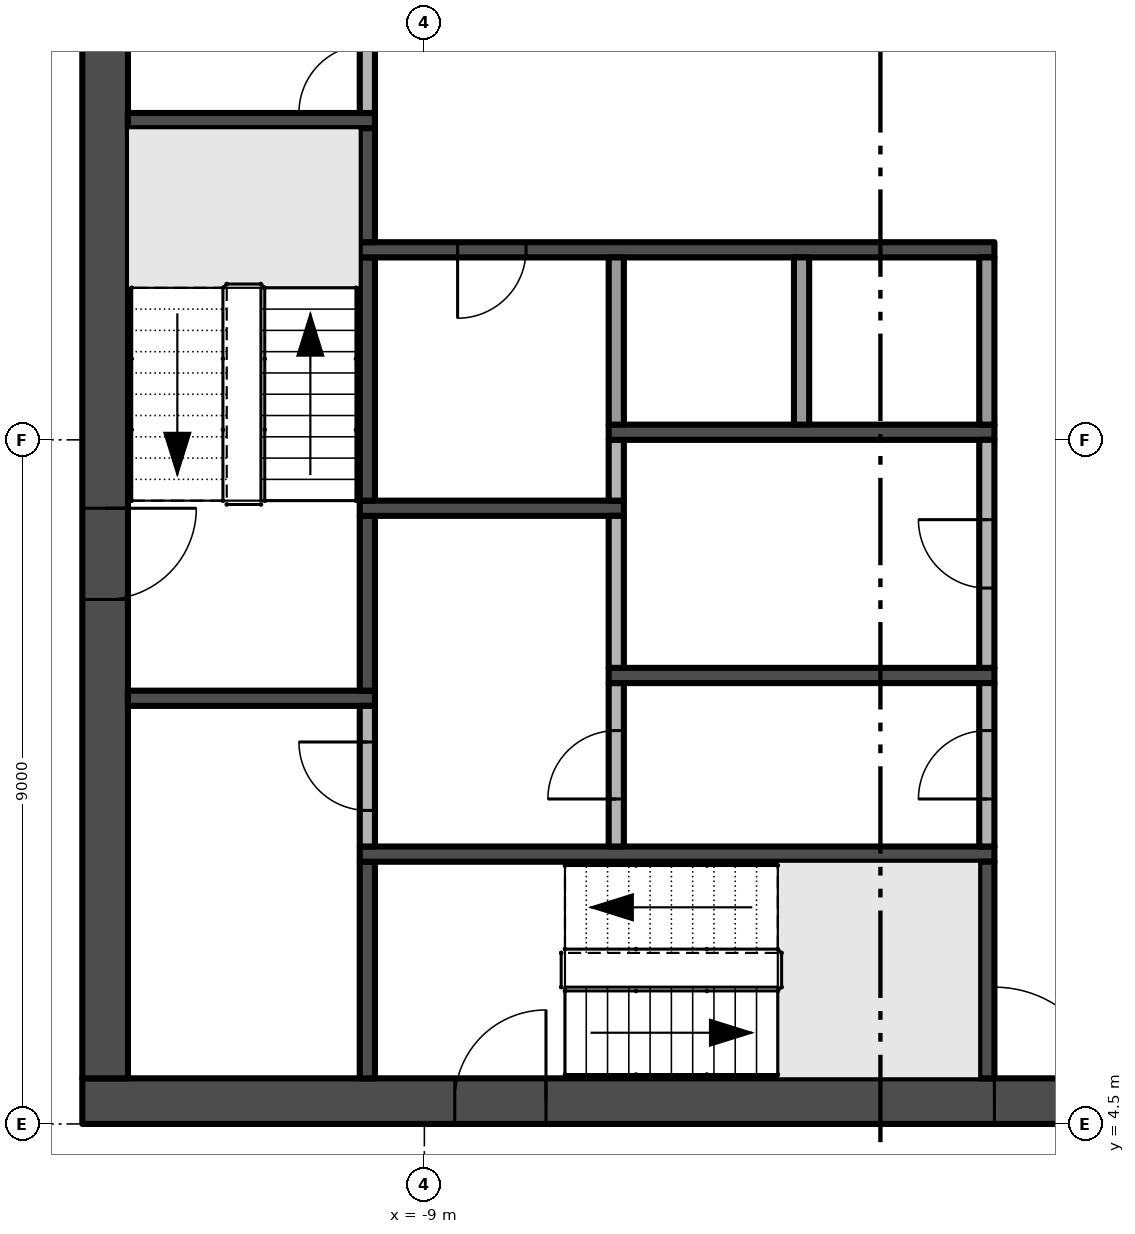
"""IFC4 building model, lengths in metres.
Left out: names, types, materials, properties, quantities, classifications, styles, units other than length and angle.
Written with IfcOpenShell. Run it as: python <this file> out.ifc"""

import sys

from ifc_helpers import new_model, si_unit, direction, frame, frame_2d, origin, place, context, subcontext, project, spatial, rectangle, extrude, element, fill, save


model = new_model("IFC4")
c1 = context("Model", 3, precision=1e-05, world=origin(), true_north=direction((0.0, 1.0)))
c2 = subcontext(c1, "Body", "Model", "MODEL_VIEW")
j1 = project(units=[si_unit("LENGTHUNIT", "METRE"), si_unit("PLANEANGLEUNIT", "RADIAN")], contexts=[c1])
p1 = place(None, origin())
s1 = spatial("IfcSite", under=j1, at=p1, CompositionType="ELEMENT")
p2 = place(p1, origin())
s2 = spatial("IfcBuilding", under=s1, at=p2, CompositionType="ELEMENT")
p3 = place(p2, frame((0.0, 0.0, 214.8)))
s3 = spatial("IfcBuildingStorey", under=s2, at=p3, CompositionType="ELEMENT", Elevation=214.8)
p4 = place(p3, frame((-13.5, 4.8, -0.3), z_axis=(0.0, 0.0, 1.0), x_axis=(1.0, 0.0, 0.0)))
e1 = element("IfcWall", 1, at=p4, inside=s3, PredefinedType="SHEAR", context=c2, shape_type="SweptSolid", body=[
    extrude(rectangle(XDim=27.0, YDim=0.6, at=frame_2d((13.5, 0.0))), origin(), (0.0, 0.0, 1.0), 3.8),
])
p5 = place(p4, frame((12.0, 0.0, 0.3)))
e2 = element("IfcOpeningElement", 2, at=p5, cuts=e1, PredefinedType="OPENING", context=c2, shape_type="SweptSolid", body=[
    extrude(rectangle(XDim=3.0, YDim=2.4, at=frame_2d((1.5, 1.2))), frame((0.0, 0.31, 0.0), z_axis=(0.0, -1.0, 0.0), x_axis=(1.0, 0.0, 0.0)), (0.0, 0.0, 1.0), 0.62),
])
p6 = place(p4, frame((4.9, 0.0, 0.3)))
e3 = element("IfcOpeningElement", 3, at=p6, cuts=e1, PredefinedType="OPENING", context=c2, shape_type="SweptSolid", body=[
    extrude(rectangle(XDim=1.2, YDim=2.2, at=frame_2d((0.6, 1.1))), frame((0.0, 0.31, 0.0), z_axis=(0.0, -1.0, 0.0), x_axis=(1.0, 0.0, 0.0)), (0.0, 0.0, 1.0), 0.62),
])
p7 = place(p4, frame((20.75, 0.0, 0.3)))
e4 = element("IfcOpeningElement", 4, at=p7, cuts=e1, PredefinedType="OPENING", context=c2, shape_type="SweptSolid", body=[
    extrude(rectangle(XDim=1.5, YDim=2.2, at=frame_2d((0.75, 1.1))), frame((0.0, 0.31, 0.0), z_axis=(0.0, -1.0, 0.0), x_axis=(1.0, 0.0, 0.0)), (0.0, 0.0, 1.0), 0.62),
])
p8 = place(p4, frame((17.4, 0.0, 0.3)))
e5 = element("IfcOpeningElement", 5, at=p8, cuts=e1, PredefinedType="OPENING", context=c2, shape_type="SweptSolid", body=[
    extrude(rectangle(XDim=1.2, YDim=2.2, at=frame_2d((0.6, 1.1))), frame((0.0, 0.31, 0.0), z_axis=(0.0, -1.0, 0.0), x_axis=(1.0, 0.0, 0.0)), (0.0, 0.0, 1.0), 0.62),
])
p9 = place(p3, frame((-13.2, 21.9, -0.3), z_axis=(0.0, 0.0, 1.0), x_axis=(0.0, -1.0, 0.0)))
e6 = element("IfcWall", 6, at=p9, inside=s3, PredefinedType="SHEAR", context=c2, shape_type="SweptSolid", body=[
    extrude(rectangle(XDim=16.8, YDim=0.6, at=frame_2d((8.4, 0.0))), origin(), (0.0, 0.0, 1.0), 3.8),
])
p10 = place(p9, frame((9.3, 0.0, 0.3)))
e7 = element("IfcOpeningElement", 7, at=p10, cuts=e6, PredefinedType="OPENING", context=c2, shape_type="SweptSolid", body=[
    extrude(rectangle(XDim=1.2, YDim=2.2, at=frame_2d((0.6, 1.1))), frame((0.0, 0.31, 0.0), z_axis=(0.0, -1.0, 0.0), x_axis=(1.0, 0.0, 0.0)), (0.0, 0.0, 1.0), 0.62),
])
for number, where, z_axis, x_axis in (
    (8, (-12.9, 10.1, 0.0), (0.0, 0.0, 1.0), (1.0, 0.0, 0.0)),
    (9, (-12.9, 17.7, 0.0), (0.0, 0.0, 1.0), (1.0, 0.0, 0.0)),
):
    element("IfcWall", number, at=place(p3, frame(where, z_axis=z_axis, x_axis=x_axis)), inside=s3, PredefinedType="SHEAR", context=c2, shape_type="SweptSolid", body=[
        extrude(rectangle(XDim=3.25, YDim=0.2, at=frame_2d((1.625, 0.0))), origin(), (0.0, 0.0, 1.0), 3.5),
    ])
p11 = place(p3, frame((-9.75, 5.1, 0.0), z_axis=(0.0, 0.0, 1.0), x_axis=(0.0, 1.0, 0.0)))
e10 = element("IfcWall", 10, at=p11, inside=s3, PredefinedType="SHEAR", context=c2, shape_type="SweptSolid", body=[
    extrude(rectangle(XDim=2.85, YDim=0.2, at=frame_2d((1.425, 0.0))), origin(), (0.0, 0.0, 1.0), 3.5),
])
p12 = place(p3, frame((-9.85, 8.05, 0.0), z_axis=(0.0, 0.0, 1.0), x_axis=(1.0, 0.0, 0.0)))
e11 = element("IfcWall", 11, at=p12, inside=s3, PredefinedType="SHEAR", context=c2, shape_type="SweptSolid", body=[
    extrude(rectangle(XDim=8.35, YDim=0.2, at=frame_2d((4.175, 0.0))), origin(), (0.0, 0.0, 1.0), 3.5),
])
p13 = place(p3, frame((-9.75, 8.15, 0.0), z_axis=(0.0, 0.0, 1.0), x_axis=(0.0, 1.0, 0.0)))
e12 = element("IfcWall", 12, at=p13, inside=s3, PredefinedType="PARTITIONING", context=c2, shape_type="SweptSolid", body=[
    extrude(rectangle(XDim=1.85, YDim=0.2, at=frame_2d((0.925, 0.0))), origin(), (0.0, 0.0, 1.0), 3.5),
])
p14 = place(p13, frame((0.475, 0.0, 0.0)))
e13 = element("IfcOpeningElement", 13, at=p14, cuts=e12, PredefinedType="OPENING", context=c2, shape_type="SweptSolid", body=[
    extrude(rectangle(XDim=0.9, YDim=2.1, at=frame_2d((0.45, 1.05))), frame((0.0, 0.11, 0.0), z_axis=(0.0, -1.0, 0.0), x_axis=(1.0, 0.0, 0.0)), (0.0, 0.0, 1.0), 0.22),
])
p15 = place(p3, frame((-9.75, 10.2, 0.0), z_axis=(0.0, 0.0, 1.0), x_axis=(0.0, 1.0, 0.0)))
e14 = element("IfcWall", 14, at=p15, inside=s3, PredefinedType="SHEAR", context=c2, shape_type="SweptSolid", body=[
    extrude(rectangle(XDim=2.3, YDim=0.2, at=frame_2d((1.15, 0.0))), origin(), (0.0, 0.0, 1.0), 3.5),
])
p16 = place(p3, frame((-9.85, 12.6, 0.0), z_axis=(0.0, 0.0, 1.0), x_axis=(1.0, 0.0, 0.0)))
e15 = element("IfcWall", 15, at=p16, inside=s3, PredefinedType="SHEAR", context=c2, shape_type="SweptSolid", body=[
    extrude(rectangle(XDim=3.475, YDim=0.2, at=frame_2d((1.738, 0.0))), origin(), (0.0, 0.0, 1.0), 3.5),
])
p17 = place(p3, frame((-9.75, 12.7, 0.0), z_axis=(0.0, 0.0, 1.0), x_axis=(0.0, 1.0, 0.0)))
e16 = element("IfcWall", 16, at=p17, inside=s3, PredefinedType="SHEAR", context=c2, shape_type="SweptSolid", body=[
    extrude(rectangle(XDim=3.2, YDim=0.2, at=frame_2d((1.6, 0.0))), origin(), (0.0, 0.0, 1.0), 3.5),
])
p18 = place(p3, frame((-1.5, 16.0, 0.0), z_axis=(0.0, 0.0, 1.0), x_axis=(-1.0, 0.0, 0.0)))
e17 = element("IfcWall", 17, at=p18, inside=s3, PredefinedType="SHEAR", context=c2, shape_type="SweptSolid", body=[
    extrude(rectangle(XDim=8.35, YDim=0.2, at=frame_2d((4.175, 0.0))), origin(), (0.0, 0.0, 1.0), 3.5),
])
p19 = place(p18, frame((6.162, 0.0, 0.0)))
e18 = element("IfcOpeningElement", 18, at=p19, cuts=e17, PredefinedType="OPENING", context=c2, shape_type="SweptSolid", body=[
    extrude(rectangle(XDim=0.9, YDim=2.1, at=frame_2d((0.45, 1.05))), frame((0.0, 0.11, 0.0), z_axis=(0.0, -1.0, 0.0), x_axis=(1.0, 0.0, 0.0)), (0.0, 0.0, 1.0), 0.22),
])
p20 = place(p3, frame((-9.75, 16.1, 0.0), z_axis=(0.0, 0.0, 1.0), x_axis=(0.0, 1.0, 0.0)))
e19 = element("IfcWall", 19, at=p20, inside=s3, PredefinedType="SHEAR", context=c2, shape_type="SweptSolid", body=[
    extrude(rectangle(XDim=1.5, YDim=0.2, at=frame_2d((0.75, 0.0))), origin(), (0.0, 0.0, 1.0), 3.5),
])
p21 = place(p3, frame((-9.75, 17.8, 0.0), z_axis=(0.0, 0.0, 1.0), x_axis=(0.0, 1.0, 0.0)))
e20 = element("IfcWall", 20, at=p21, inside=s3, PredefinedType="PARTITIONING", context=c2, shape_type="SweptSolid", body=[
    extrude(rectangle(XDim=1.4, YDim=0.2, at=frame_2d((0.7, 0.0))), origin(), (0.0, 0.0, 1.0), 3.5),
])
p22 = place(p21, origin())
e21 = element("IfcOpeningElement", 21, at=p22, cuts=e20, PredefinedType="OPENING", context=c2, shape_type="SweptSolid", body=[
    extrude(rectangle(XDim=0.9, YDim=2.1, at=frame_2d((0.45, 1.05))), frame((0.0, 0.11, 0.0), z_axis=(0.0, -1.0, 0.0), x_axis=(1.0, 0.0, 0.0)), (0.0, 0.0, 1.0), 0.22),
])
p23 = place(p3, frame((-6.475, 8.15, 0.0), z_axis=(0.0, 0.0, 1.0), x_axis=(0.0, 1.0, 0.0)))
e22 = element("IfcWall", 22, at=p23, inside=s3, PredefinedType="PARTITIONING", context=c2, shape_type="SweptSolid", body=[
    extrude(rectangle(XDim=2.15, YDim=0.2, at=frame_2d((1.075, 0.0))), origin(), (0.0, 0.0, 1.0), 3.5),
])
p24 = place(p23, frame((0.625, 0.0, 0.0)))
e23 = element("IfcOpeningElement", 23, at=p24, cuts=e22, PredefinedType="OPENING", context=c2, shape_type="SweptSolid", body=[
    extrude(rectangle(XDim=0.9, YDim=2.1, at=frame_2d((0.45, 1.05))), frame((0.0, 0.11, 0.0), z_axis=(0.0, -1.0, 0.0), x_axis=(1.0, 0.0, 0.0)), (0.0, 0.0, 1.0), 0.22),
])
p25 = place(p3, frame((-6.575, 10.4, 0.0), z_axis=(0.0, 0.0, 1.0), x_axis=(1.0, 0.0, 0.0)))
e24 = element("IfcWall", 24, at=p25, inside=s3, PredefinedType="SHEAR", context=c2, shape_type="SweptSolid", body=[
    extrude(rectangle(XDim=5.075, YDim=0.2, at=frame_2d((2.538, 0.0))), origin(), (0.0, 0.0, 1.0), 3.5),
])
p26 = place(p3, frame((-6.475, 10.5, 0.0), z_axis=(0.0, 0.0, 1.0), x_axis=(0.0, 1.0, 0.0)))
e25 = element("IfcWall", 25, at=p26, inside=s3, PredefinedType="PARTITIONING", context=c2, shape_type="SweptSolid", body=[
    extrude(rectangle(XDim=2.0, YDim=0.2, at=frame_2d((1.0, 0.0))), origin(), (0.0, 0.0, 1.0), 3.5),
])
p27 = place(p3, frame((-6.475, 12.7, 0.0), z_axis=(0.0, 0.0, 1.0), x_axis=(0.0, 1.0, 0.0)))
e26 = element("IfcWall", 26, at=p27, inside=s3, PredefinedType="PARTITIONING", context=c2, shape_type="SweptSolid", body=[
    extrude(rectangle(XDim=0.8, YDim=0.2, at=frame_2d((0.4, 0.0))), origin(), (0.0, 0.0, 1.0), 3.5),
])
p28 = place(p3, frame((-6.575, 13.6, 0.0), z_axis=(0.0, 0.0, 1.0), x_axis=(1.0, 0.0, 0.0)))
e27 = element("IfcWall", 27, at=p28, inside=s3, PredefinedType="SHEAR", context=c2, shape_type="SweptSolid", body=[
    extrude(rectangle(XDim=5.075, YDim=0.2, at=frame_2d((2.538, 0.0))), origin(), (0.0, 0.0, 1.0), 3.5),
])
for number, where, z_axis, x_axis in (
    (28, (-6.475, 13.7, 0.0), (0.0, 0.0, 1.0), (0.0, 1.0, 0.0)),
    (29, (-4.037, 13.7, 0.0), (0.0, 0.0, 1.0), (0.0, 1.0, 0.0)),
):
    element("IfcWall", number, at=place(p3, frame(where, z_axis=z_axis, x_axis=x_axis)), inside=s3, PredefinedType="PARTITIONING", context=c2, shape_type="SweptSolid", body=[
        extrude(rectangle(XDim=2.2, YDim=0.2, at=frame_2d((1.1, 0.0))), origin(), (0.0, 0.0, 1.0), 3.5),
    ])
p29 = place(p3, frame((-1.6, 5.1, 0.0), z_axis=(0.0, 0.0, 1.0), x_axis=(0.0, 1.0, 0.0)))
e30 = element("IfcWall", 30, at=p29, inside=s3, PredefinedType="SHEAR", context=c2, shape_type="SweptSolid", body=[
    extrude(rectangle(XDim=2.85, YDim=0.2, at=frame_2d((1.425, 0.0))), origin(), (0.0, 0.0, 1.0), 3.5),
])
p30 = place(p3, frame((-1.6, 8.15, 0.0), z_axis=(0.0, 0.0, 1.0), x_axis=(0.0, 1.0, 0.0)))
e31 = element("IfcWall", 31, at=p30, inside=s3, PredefinedType="PARTITIONING", context=c2, shape_type="SweptSolid", body=[
    extrude(rectangle(XDim=2.15, YDim=0.2, at=frame_2d((1.075, 0.0))), origin(), (0.0, 0.0, 1.0), 3.5),
])
p31 = place(p30, frame((0.625, 0.0, 0.0)))
e32 = element("IfcOpeningElement", 32, at=p31, cuts=e31, PredefinedType="OPENING", context=c2, shape_type="SweptSolid", body=[
    extrude(rectangle(XDim=0.9, YDim=2.1, at=frame_2d((0.45, 1.05))), frame((0.0, 0.11, 0.0), z_axis=(0.0, -1.0, 0.0), x_axis=(1.0, 0.0, 0.0)), (0.0, 0.0, 1.0), 0.22),
])
p32 = place(p3, frame((-1.6, 10.5, 0.0), z_axis=(0.0, 0.0, 1.0), x_axis=(0.0, 1.0, 0.0)))
e33 = element("IfcWall", 33, at=p32, inside=s3, PredefinedType="PARTITIONING", context=c2, shape_type="SweptSolid", body=[
    extrude(rectangle(XDim=3.0, YDim=0.2, at=frame_2d((1.5, 0.0))), origin(), (0.0, 0.0, 1.0), 3.5),
])
p33 = place(p32, frame((1.05, 0.0, 0.0)))
e34 = element("IfcOpeningElement", 34, at=p33, cuts=e33, PredefinedType="OPENING", context=c2, shape_type="SweptSolid", body=[
    extrude(rectangle(XDim=0.9, YDim=2.1, at=frame_2d((0.45, 1.05))), frame((0.0, 0.11, 0.0), z_axis=(0.0, -1.0, 0.0), x_axis=(1.0, 0.0, 0.0)), (0.0, 0.0, 1.0), 0.22),
])
p34 = place(p3, frame((-1.6, 13.7, 0.0), z_axis=(0.0, 0.0, 1.0), x_axis=(0.0, 1.0, 0.0)))
e35 = element("IfcWall", 35, at=p34, inside=s3, PredefinedType="PARTITIONING", context=c2, shape_type="SweptSolid", body=[
    extrude(rectangle(XDim=2.2, YDim=0.2, at=frame_2d((1.1, 0.0))), origin(), (0.0, 0.0, 1.0), 3.5),
])
p35 = place(p5, frame((3.0, 0.0, 0.0), z_axis=(0.0, 0.0, 1.0), x_axis=(-1.0, 0.0, 0.0)))
e36 = element("IfcDoor", 36, at=p35, inside=s3, OperationType="DOUBLE_DOOR_SINGLE_SWING", PredefinedType="DOOR", context=c2, shape_type="SweptSolid", body=[
    extrude(rectangle(XDim=3.0, YDim=2.4, at=frame_2d((1.5, 1.2))), frame((0.0, 0.025, 0.0), z_axis=(0.0, -1.0, 0.0), x_axis=(1.0, 0.0, 0.0)), (0.0, 0.0, 1.0), 0.05),
])
fill(e2, e36)
p36 = place(p10, frame((1.2, 0.0, 0.0), z_axis=(0.0, 0.0, 1.0), x_axis=(-1.0, 0.0, 0.0)))
e37 = element("IfcDoor", 37, at=p36, inside=s3, OperationType="SINGLE_SWING_RIGHT", PredefinedType="DOOR", context=c2, shape_type="SweptSolid", body=[
    extrude(rectangle(XDim=1.2, YDim=2.2, at=frame_2d((0.6, 1.1))), frame((0.0, 0.025, 0.0), z_axis=(0.0, -1.0, 0.0), x_axis=(1.0, 0.0, 0.0)), (0.0, 0.0, 1.0), 0.05),
])
fill(e7, e37)
p37 = place(p6, frame((1.2, 0.0, 0.0), z_axis=(0.0, 0.0, 1.0), x_axis=(-1.0, 0.0, 0.0)))
e38 = element("IfcDoor", 38, at=p37, inside=s3, OperationType="SINGLE_SWING_LEFT", PredefinedType="DOOR", context=c2, shape_type="SweptSolid", body=[
    extrude(rectangle(XDim=1.2, YDim=2.2, at=frame_2d((0.6, 1.1))), frame((0.0, 0.025, 0.0), z_axis=(0.0, -1.0, 0.0), x_axis=(1.0, 0.0, 0.0)), (0.0, 0.0, 1.0), 0.05),
])
fill(e3, e38)
p38 = place(p19, origin())
e39 = element("IfcDoor", 39, at=p38, inside=s3, OperationType="SINGLE_SWING_RIGHT", PredefinedType="DOOR", context=c2, shape_type="SweptSolid", body=[
    extrude(rectangle(XDim=0.9, YDim=2.1, at=frame_2d((0.45, 1.05))), frame((0.0, 0.025, 0.0), z_axis=(0.0, -1.0, 0.0), x_axis=(1.0, 0.0, 0.0)), (0.0, 0.0, 1.0), 0.05),
])
fill(e18, e39)
p39 = place(p31, origin())
e40 = element("IfcDoor", 40, at=p39, inside=s3, OperationType="SINGLE_SWING_LEFT", PredefinedType="DOOR", context=c2, shape_type="SweptSolid", body=[
    extrude(rectangle(XDim=0.9, YDim=2.1, at=frame_2d((0.45, 1.05))), frame((0.0, 0.025, 0.0), z_axis=(0.0, -1.0, 0.0), x_axis=(1.0, 0.0, 0.0)), (0.0, 0.0, 1.0), 0.05),
])
fill(e32, e40)
p40 = place(p33, origin())
e41 = element("IfcDoor", 41, at=p40, inside=s3, OperationType="SINGLE_SWING_RIGHT", PredefinedType="DOOR", context=c2, shape_type="SweptSolid", body=[
    extrude(rectangle(XDim=0.9, YDim=2.1, at=frame_2d((0.45, 1.05))), frame((0.0, 0.025, 0.0), z_axis=(0.0, -1.0, 0.0), x_axis=(1.0, 0.0, 0.0)), (0.0, 0.0, 1.0), 0.05),
])
fill(e34, e41)
p41 = place(p22, origin())
e42 = element("IfcDoor", 42, at=p41, inside=s3, OperationType="SINGLE_SWING_LEFT", PredefinedType="DOOR", context=c2, shape_type="SweptSolid", body=[
    extrude(rectangle(XDim=0.9, YDim=2.1, at=frame_2d((0.45, 1.05))), frame((0.0, 0.025, 0.0), z_axis=(0.0, -1.0, 0.0), x_axis=(1.0, 0.0, 0.0)), (0.0, 0.0, 1.0), 0.05),
])
fill(e21, e42)
p42 = place(p24, origin())
e43 = element("IfcDoor", 43, at=p42, inside=s3, OperationType="SINGLE_SWING_LEFT", PredefinedType="DOOR", context=c2, shape_type="SweptSolid", body=[
    extrude(rectangle(XDim=0.9, YDim=2.1, at=frame_2d((0.45, 1.05))), frame((0.0, 0.025, 0.0), z_axis=(0.0, -1.0, 0.0), x_axis=(1.0, 0.0, 0.0)), (0.0, 0.0, 1.0), 0.05),
])
fill(e23, e43)
p43 = place(p14, origin())
e44 = element("IfcDoor", 44, at=p43, inside=s3, OperationType="SINGLE_SWING_RIGHT", PredefinedType="DOOR", context=c2, shape_type="SweptSolid", body=[
    extrude(rectangle(XDim=0.9, YDim=2.1, at=frame_2d((0.45, 1.05))), frame((0.0, 0.025, 0.0), z_axis=(0.0, -1.0, 0.0), x_axis=(1.0, 0.0, 0.0)), (0.0, 0.0, 1.0), 0.05),
])
fill(e13, e44)
save(model, sys.argv[1])
